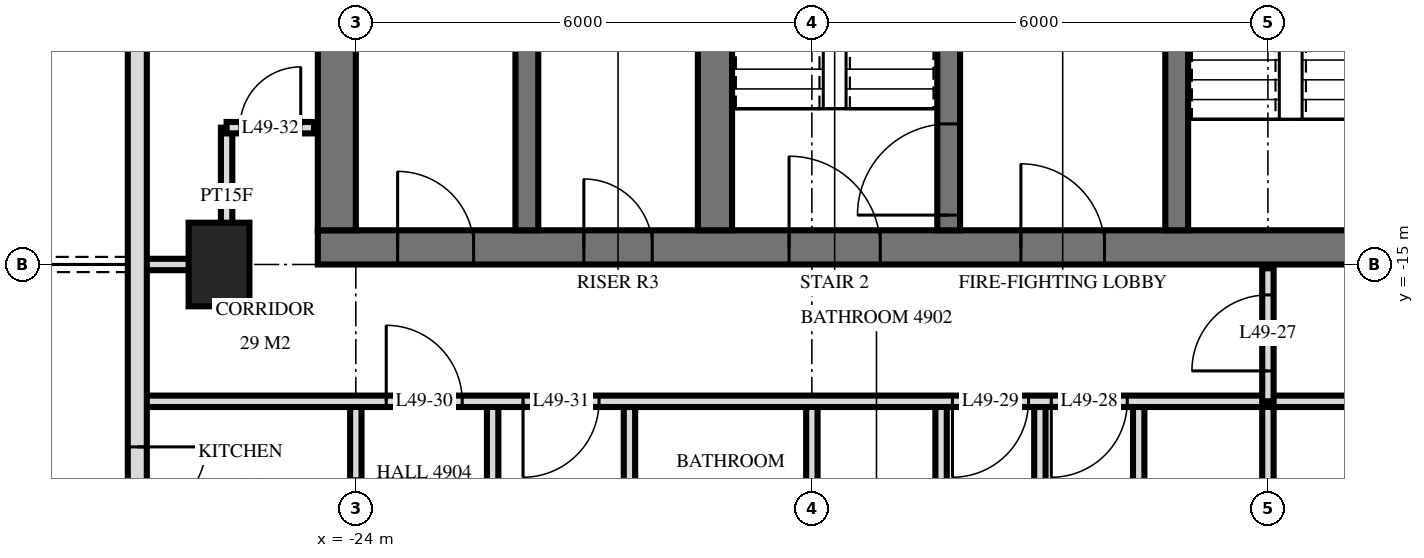
"""IFC4 building model, lengths in metres.
Left out: names, types, materials, properties, quantities, classifications, styles, units other than length and angle.
Written with IfcOpenShell. Run it as: python <this file> out.ifc"""

import sys

from ifc_helpers import new_model, si_unit, direction, frame, frame_2d, origin, origin_2d, place, context, subcontext, project, spatial, rectangle, extrude, element, fill, save


model = new_model("IFC4")
c1 = context("Model", 3, precision=1e-05, world=origin(), true_north=direction((0.0, 1.0)))
c2 = subcontext(c1, "Body", "Model", "MODEL_VIEW")
j1 = project(units=[si_unit("LENGTHUNIT", "METRE"), si_unit("PLANEANGLEUNIT", "RADIAN")], contexts=[c1])
p1 = place(None, origin())
s1 = spatial("IfcSite", under=j1, at=p1, CompositionType="ELEMENT")
p2 = place(p1, origin())
s2 = spatial("IfcBuilding", under=s1, at=p2, CompositionType="ELEMENT")
p3 = place(p2, frame((0.0, 0.0, 190.6)))
s3 = spatial("IfcBuildingStorey", under=s2, at=p3, CompositionType="ELEMENT", Elevation=190.6)
p4 = place(p3, frame((-25.8, -15.0, 0.0), z_axis=(0.0, 0.0, 1.0), x_axis=(0.0, 1.0, 0.0)))
e1 = element("IfcColumn", 1, at=p4, inside=s3, PredefinedType="COLUMN", context=c2, shape_type="SweptSolid", body=[
    extrude(rectangle(XDim=1.1, YDim=0.8, at=origin_2d()), origin(), (0.0, 0.0, 1.0), 3.5),
])
p5 = place(p3, frame((-24.5, -14.775, 0.0), z_axis=(0.0, 0.0, 1.0), x_axis=(1.0, 0.0, 0.0)))
e2 = element("IfcWall", 2, at=p5, inside=s3, PredefinedType="SHEAR", context=c2, shape_type="SweptSolid", body=[
    extrude(rectangle(XDim=14.5, YDim=0.45, at=frame_2d((7.25, 0.0))), origin(), (0.0, 0.0, 1.0), 3.5),
])
p6 = place(p5, frame((6.2, 0.0, 0.0)))
e3 = element("IfcOpeningElement", 3, at=p6, cuts=e2, PredefinedType="OPENING", context=c2, shape_type="SweptSolid", body=[
    extrude(rectangle(XDim=1.2, YDim=2.1, at=frame_2d((0.6, 1.05))), frame((0.0, 0.235, 0.0), z_axis=(0.0, -1.0, 0.0), x_axis=(1.0, 0.0, 0.0)), (0.0, 0.0, 1.0), 0.47),
])
p7 = place(p5, frame((9.25, 0.0, 0.0)))
e4 = element("IfcOpeningElement", 4, at=p7, cuts=e2, PredefinedType="OPENING", context=c2, shape_type="SweptSolid", body=[
    extrude(rectangle(XDim=1.1, YDim=2.1, at=frame_2d((0.55, 1.05))), frame((0.0, 0.235, 0.0), z_axis=(0.0, -1.0, 0.0), x_axis=(1.0, 0.0, 0.0)), (0.0, 0.0, 1.0), 0.47),
])
p8 = place(p5, frame((3.5, 0.0, 0.0)))
e5 = element("IfcOpeningElement", 5, at=p8, cuts=e2, PredefinedType="OPENING", context=c2, shape_type="SweptSolid", body=[
    extrude(rectangle(XDim=0.9, YDim=2.1, at=frame_2d((0.45, 1.05))), frame((0.0, 0.235, 0.0), z_axis=(0.0, -1.0, 0.0), x_axis=(1.0, 0.0, 0.0)), (0.0, 0.0, 1.0), 0.47),
])
p9 = place(p5, frame((1.05, 0.0, 0.0)))
e6 = element("IfcOpeningElement", 6, at=p9, cuts=e2, PredefinedType="OPENING", context=c2, shape_type="SweptSolid", body=[
    extrude(rectangle(XDim=1.0, YDim=2.1, at=frame_2d((0.5, 1.05))), frame((0.0, 0.235, 0.0), z_axis=(0.0, -1.0, 0.0), x_axis=(1.0, 0.0, 0.0)), (0.0, 0.0, 1.0), 0.47),
])
p10 = place(p3, frame((-24.25, -14.55, 0.0), z_axis=(0.0, 0.0, 1.0), x_axis=(0.0, 1.0, 0.0)))
e7 = element("IfcWall", 7, at=p10, inside=s3, PredefinedType="SHEAR", context=c2, shape_type="SweptSolid", body=[
    extrude(rectangle(XDim=14.1, YDim=0.5, at=frame_2d((7.05, 0.0))), origin(), (0.0, 0.0, 1.0), 3.5),
])
p11 = place(p3, frame((-13.2, -14.55, 0.0), z_axis=(0.0, 0.0, 1.0), x_axis=(0.0, 1.0, 0.0)))
e8 = element("IfcWall", 8, at=p11, inside=s3, PredefinedType="SHEAR", context=c2, shape_type="SweptSolid", body=[
    extrude(rectangle(XDim=5.4, YDim=0.3, at=frame_2d((2.7, 0.0))), origin(), (0.0, 0.0, 1.0), 3.5),
])
p12 = place(p11, frame((4.0, 0.0, 0.0)))
e9 = element("IfcOpeningElement", 9, at=p12, cuts=e8, PredefinedType="OPENING", context=c2, shape_type="SweptSolid", body=[
    extrude(rectangle(XDim=1.2, YDim=2.1, at=frame_2d((0.6, 1.05))), frame((0.0, 0.16, 0.0), z_axis=(0.0, -1.0, 0.0), x_axis=(1.0, 0.0, 0.0)), (0.0, 0.0, 1.0), 0.32),
])
p13 = place(p3, frame((-16.2, -14.55, 0.0), z_axis=(0.0, 0.0, 1.0), x_axis=(0.0, 1.0, 0.0)))
e10 = element("IfcWall", 10, at=p13, inside=s3, PredefinedType="SHEAR", context=c2, shape_type="SweptSolid", body=[
    extrude(rectangle(XDim=5.4, YDim=0.3, at=frame_2d((2.7, 0.0))), origin(), (0.0, 0.0, 1.0), 3.5),
])
p14 = place(p13, frame((0.2, 0.0, 0.0)))
e11 = element("IfcOpeningElement", 11, at=p14, cuts=e10, PredefinedType="OPENING", context=c2, shape_type="SweptSolid", body=[
    extrude(rectangle(XDim=1.2, YDim=2.1, at=frame_2d((0.6, 1.05))), frame((0.0, 0.16, 0.0), z_axis=(0.0, -1.0, 0.0), x_axis=(1.0, 0.0, 0.0)), (0.0, 0.0, 1.0), 0.32),
])
p15 = place(p3, frame((-19.275, -14.55, 0.0), z_axis=(0.0, 0.0, 1.0), x_axis=(0.0, 1.0, 0.0)))
e12 = element("IfcWall", 12, at=p15, inside=s3, PredefinedType="SHEAR", context=c2, shape_type="SweptSolid", body=[
    extrude(rectangle(XDim=5.4, YDim=0.45, at=frame_2d((2.7, 0.0))), origin(), (0.0, 0.0, 1.0), 3.5),
])
p16 = place(p3, frame((-21.75, -14.55, 0.0), z_axis=(0.0, 0.0, 1.0), x_axis=(0.0, 1.0, 0.0)))
e13 = element("IfcWall", 13, at=p16, inside=s3, PredefinedType="SHEAR", context=c2, shape_type="SweptSolid", body=[
    extrude(rectangle(XDim=5.4, YDim=0.3, at=frame_2d((2.7, 0.0))), origin(), (0.0, 0.0, 1.0), 3.5),
])
p17 = place(p3, frame((-26.875, -3.325, 0.0), z_axis=(0.0, 0.0, 1.0), x_axis=(0.0, -1.0, 0.0)))
e14 = element("IfcWall", 14, at=p17, inside=s3, PredefinedType="SOLIDWALL", context=c2, shape_type="SweptSolid", body=[
    extrude(rectangle(XDim=21.551, YDim=0.25, at=frame_2d((10.775, 0.0))), origin(), (0.0, 0.0, 1.0), 3.22),
])
p18 = place(p17, frame((7.025, 0.0, 0.0)))
e15 = element("IfcOpeningElement", 15, at=p18, cuts=e14, PredefinedType="OPENING", context=c2, shape_type="SweptSolid", body=[
    extrude(rectangle(XDim=1.8, YDim=2.4, at=frame_2d((0.9, 1.2))), frame((0.0, 0.135, 0.0), z_axis=(0.0, -1.0, 0.0), x_axis=(1.0, 0.0, 0.0)), (0.0, 0.0, 1.0), 0.27),
])
p19 = place(p17, frame((14.075, 0.0, 0.0)))
e16 = element("IfcOpeningElement", 16, at=p19, cuts=e14, PredefinedType="OPENING", context=c2, shape_type="SweptSolid", body=[
    extrude(rectangle(XDim=1.8, YDim=2.4, at=frame_2d((0.9, 1.2))), frame((0.0, 0.135, 0.0), z_axis=(0.0, -1.0, 0.0), x_axis=(1.0, 0.0, 0.0)), (0.0, 0.0, 1.0), 0.27),
])
p20 = place(p17, frame((18.875, 0.0, 0.0)))
e17 = element("IfcOpeningElement", 17, at=p20, cuts=e14, PredefinedType="OPENING", context=c2, shape_type="SweptSolid", body=[
    extrude(rectangle(XDim=1.8, YDim=2.4, at=frame_2d((0.9, 1.2))), frame((0.0, 0.135, 0.0), z_axis=(0.0, -1.0, 0.0), x_axis=(1.0, 0.0, 0.0)), (0.0, 0.0, 1.0), 0.27),
])
p21 = place(p3, frame((-12.0, -16.8, 0.0), z_axis=(0.0, 0.0, 1.0), x_axis=(0.0, 1.0, 0.0)))
e18 = element("IfcWall", 18, at=p21, inside=s3, PredefinedType="PARTITIONING", context=c2, shape_type="SweptSolid", body=[
    extrude(rectangle(XDim=1.75, YDim=0.15, at=frame_2d((0.875, 0.0))), origin(), (0.0, 0.0, 1.0), 3.22),
])
p22 = place(p21, frame((0.4, 0.0, 0.0)))
e19 = element("IfcOpeningElement", 19, at=p22, cuts=e18, PredefinedType="OPENING", context=c2, shape_type="SweptSolid", body=[
    extrude(rectangle(XDim=1.0, YDim=2.1, at=frame_2d((0.5, 1.05))), frame((0.0, 0.085, 0.0), z_axis=(0.0, -1.0, 0.0), x_axis=(1.0, 0.0, 0.0)), (0.0, 0.0, 1.0), 0.17),
])
p23 = place(p3, frame((-12.0, -29.22, 0.0), z_axis=(0.0, 0.0, 1.0), x_axis=(0.0, 1.0, 0.0)))
e20 = element("IfcWall", 20, at=p23, inside=s3, PredefinedType="PARTITIONING", context=c2, shape_type="SweptSolid", body=[
    extrude(rectangle(XDim=12.42, YDim=0.15, at=frame_2d((6.21, 0.0))), origin(), (0.0, 0.0, 1.0), 3.22),
])
p24 = place(p3, frame((-13.7, -19.8, 0.0), z_axis=(0.0, 0.0, 1.0), x_axis=(0.0, 1.0, 0.0)))
e21 = element("IfcWall", 21, at=p24, inside=s3, PredefinedType="PARTITIONING", context=c2, shape_type="SweptSolid", body=[
    extrude(rectangle(XDim=3.0, YDim=0.15, at=frame_2d((1.5, 0.0))), origin(), (0.0, 0.0, 1.0), 3.22),
])
p25 = place(p24, frame((1.1, 0.0, 0.0)))
e22 = element("IfcOpeningElement", 22, at=p25, cuts=e21, PredefinedType="OPENING", context=c2, shape_type="SweptSolid", body=[
    extrude(rectangle(XDim=0.8, YDim=2.1, at=frame_2d((0.4, 1.05))), frame((0.0, 0.085, 0.0), z_axis=(0.0, -1.0, 0.0), x_axis=(1.0, 0.0, 0.0)), (0.0, 0.0, 1.0), 0.17),
])
p26 = place(p3, frame((-15.0, -29.22, 0.0), z_axis=(0.0, 0.0, 1.0), x_axis=(0.0, 1.0, 0.0)))
e23 = element("IfcWall", 23, at=p26, inside=s3, PredefinedType="PARTITIONING", context=c2, shape_type="SweptSolid", body=[
    extrude(rectangle(XDim=12.42, YDim=0.15, at=frame_2d((6.21, 0.0))), origin(), (0.0, 0.0, 1.0), 3.22),
])
p27 = place(p3, frame((-16.3, -19.8, 0.0), z_axis=(0.0, 0.0, 1.0), x_axis=(0.0, 1.0, 0.0)))
e24 = element("IfcWall", 24, at=p27, inside=s3, PredefinedType="PARTITIONING", context=c2, shape_type="SweptSolid", body=[
    extrude(rectangle(XDim=3.0, YDim=0.15, at=frame_2d((1.5, 0.0))), origin(), (0.0, 0.0, 1.0), 3.22),
])
p28 = place(p27, frame((1.1, 0.0, 0.0)))
e25 = element("IfcOpeningElement", 25, at=p28, cuts=e24, PredefinedType="OPENING", context=c2, shape_type="SweptSolid", body=[
    extrude(rectangle(XDim=0.8, YDim=2.1, at=frame_2d((0.4, 1.05))), frame((0.0, 0.085, 0.0), z_axis=(0.0, -1.0, 0.0), x_axis=(1.0, 0.0, 0.0)), (0.0, 0.0, 1.0), 0.17),
])
p29 = place(p3, frame((-18.0, -29.22, 0.0), z_axis=(0.0, 0.0, 1.0), x_axis=(0.0, 1.0, 0.0)))
e26 = element("IfcWall", 26, at=p29, inside=s3, PredefinedType="PARTITIONING", context=c2, shape_type="SweptSolid", body=[
    extrude(rectangle(XDim=12.42, YDim=0.15, at=frame_2d((6.21, 0.0))), origin(), (0.0, 0.0, 1.0), 3.22),
])
for number, where, z_axis, x_axis in (
    (27, (-20.4, -19.8, 0.0), (0.0, 0.0, 1.0), (0.0, 1.0, 0.0)),
    (28, (-22.2, -19.8, 0.0), (0.0, 0.0, 1.0), (0.0, 1.0, 0.0)),
):
    element("IfcWall", number, at=place(p3, frame(where, z_axis=z_axis, x_axis=x_axis)), inside=s3, PredefinedType="PARTITIONING", context=c2, shape_type="SweptSolid", body=[
        extrude(rectangle(XDim=3.0, YDim=0.15, at=frame_2d((1.5, 0.0))), origin(), (0.0, 0.0, 1.0), 3.22),
    ])
p30 = place(p3, frame((-24.0, -19.8, 0.0), z_axis=(0.0, 0.0, 1.0), x_axis=(0.0, 1.0, 0.0)))
e29 = element("IfcWall", 29, at=p30, inside=s3, PredefinedType="PARTITIONING", context=c2, shape_type="SweptSolid", body=[
    extrude(rectangle(XDim=3.0, YDim=0.15, at=frame_2d((1.5, 0.0))), origin(), (0.0, 0.0, 1.0), 3.22),
])
p31 = place(p30, frame((0.98, 0.0, 0.0)))
e30 = element("IfcOpeningElement", 30, at=p31, cuts=e29, PredefinedType="OPENING", context=c2, shape_type="SweptSolid", body=[
    extrude(rectangle(XDim=1.0, YDim=2.1, at=frame_2d((0.5, 1.05))), frame((0.0, 0.085, 0.0), z_axis=(0.0, -1.0, 0.0), x_axis=(1.0, 0.0, 0.0)), (0.0, 0.0, 1.0), 0.17),
])
p32 = place(p3, frame((-25.7, -15.0, 0.0), z_axis=(0.0, 0.0, 1.0), x_axis=(0.0, 1.0, 0.0)))
e31 = element("IfcWall", 31, at=p32, inside=s3, PredefinedType="PARTITIONING", context=c2, shape_type="SweptSolid", body=[
    extrude(rectangle(XDim=1.8, YDim=0.15, at=frame_2d((0.9, 0.0))), origin(), (0.0, 0.0, 1.0), 3.22),
])
p33 = place(p3, frame((-26.82, -16.8, 0.0), z_axis=(0.0, 0.0, 1.0), x_axis=(1.0, 0.0, 0.0)))
e32 = element("IfcWall", 32, at=p33, inside=s3, PredefinedType="PARTITIONING", context=c2, shape_type="SweptSolid", body=[
    extrude(rectangle(XDim=53.64, YDim=0.15, at=frame_2d((26.82, 0.0))), origin(), (0.0, 0.0, 1.0), 3.22),
])
p34 = place(p33, frame((11.97, 0.0, 0.0)))
e33 = element("IfcOpeningElement", 33, at=p34, cuts=e32, PredefinedType="OPENING", context=c2, shape_type="SweptSolid", body=[
    extrude(rectangle(XDim=1.0, YDim=2.1, at=frame_2d((0.5, 1.05))), frame((0.0, 0.085, 0.0), z_axis=(0.0, -1.0, 0.0), x_axis=(1.0, 0.0, 0.0)), (0.0, 0.0, 1.0), 0.17),
])
p35 = place(p33, frame((10.67, 0.0, 0.0)))
e34 = element("IfcOpeningElement", 34, at=p35, cuts=e32, PredefinedType="OPENING", context=c2, shape_type="SweptSolid", body=[
    extrude(rectangle(XDim=1.0, YDim=2.1, at=frame_2d((0.5, 1.05))), frame((0.0, 0.085, 0.0), z_axis=(0.0, -1.0, 0.0), x_axis=(1.0, 0.0, 0.0)), (0.0, 0.0, 1.0), 0.17),
])
p36 = place(p33, frame((3.22, 0.0, 0.0)))
e35 = element("IfcOpeningElement", 35, at=p36, cuts=e32, PredefinedType="OPENING", context=c2, shape_type="SweptSolid", body=[
    extrude(rectangle(XDim=1.0, YDim=2.1, at=frame_2d((0.5, 1.05))), frame((0.0, 0.085, 0.0), z_axis=(0.0, -1.0, 0.0), x_axis=(1.0, 0.0, 0.0)), (0.0, 0.0, 1.0), 0.17),
])
p37 = place(p33, frame((5.02, 0.0, 0.0)))
e36 = element("IfcOpeningElement", 36, at=p37, cuts=e32, PredefinedType="OPENING", context=c2, shape_type="SweptSolid", body=[
    extrude(rectangle(XDim=1.0, YDim=2.1, at=frame_2d((0.5, 1.05))), frame((0.0, 0.085, 0.0), z_axis=(0.0, -1.0, 0.0), x_axis=(1.0, 0.0, 0.0)), (0.0, 0.0, 1.0), 0.17),
])
p38 = place(p33, frame((38.97, 0.0, 0.0)))
e37 = element("IfcOpeningElement", 37, at=p38, cuts=e32, PredefinedType="OPENING", context=c2, shape_type="SweptSolid", body=[
    extrude(rectangle(XDim=1.0, YDim=2.1, at=frame_2d((0.5, 1.05))), frame((0.0, 0.085, 0.0), z_axis=(0.0, -1.0, 0.0), x_axis=(1.0, 0.0, 0.0)), (0.0, 0.0, 1.0), 0.17),
])
p39 = place(p33, frame((48.72, 0.0, 0.0)))
e38 = element("IfcOpeningElement", 38, at=p39, cuts=e32, PredefinedType="OPENING", context=c2, shape_type="SweptSolid", body=[
    extrude(rectangle(XDim=1.0, YDim=2.1, at=frame_2d((0.5, 1.05))), frame((0.0, 0.085, 0.0), z_axis=(0.0, -1.0, 0.0), x_axis=(1.0, 0.0, 0.0)), (0.0, 0.0, 1.0), 0.17),
])
p40 = place(p33, frame((46.92, 0.0, 0.0)))
e39 = element("IfcOpeningElement", 39, at=p40, cuts=e32, PredefinedType="OPENING", context=c2, shape_type="SweptSolid", body=[
    extrude(rectangle(XDim=1.0, YDim=2.1, at=frame_2d((0.5, 1.05))), frame((0.0, 0.085, 0.0), z_axis=(0.0, -1.0, 0.0), x_axis=(1.0, 0.0, 0.0)), (0.0, 0.0, 1.0), 0.17),
])
p41 = place(p33, frame((18.32, 0.0, 0.0)))
e40 = element("IfcOpeningElement", 40, at=p41, cuts=e32, PredefinedType="OPENING", context=c2, shape_type="SweptSolid", body=[
    extrude(rectangle(XDim=1.0, YDim=2.1, at=frame_2d((0.5, 1.05))), frame((0.0, 0.085, 0.0), z_axis=(0.0, -1.0, 0.0), x_axis=(1.0, 0.0, 0.0)), (0.0, 0.0, 1.0), 0.17),
])
p42 = place(p33, frame((26.32, 0.0, 0.0)))
e41 = element("IfcOpeningElement", 41, at=p42, cuts=e32, PredefinedType="OPENING", context=c2, shape_type="SweptSolid", body=[
    extrude(rectangle(XDim=1.0, YDim=2.1, at=frame_2d((0.5, 1.05))), frame((0.0, 0.085, 0.0), z_axis=(0.0, -1.0, 0.0), x_axis=(1.0, 0.0, 0.0)), (0.0, 0.0, 1.0), 0.17),
])
p43 = place(p33, frame((34.32, 0.0, 0.0)))
e42 = element("IfcOpeningElement", 42, at=p43, cuts=e32, PredefinedType="OPENING", context=c2, shape_type="SweptSolid", body=[
    extrude(rectangle(XDim=1.0, YDim=2.1, at=frame_2d((0.5, 1.05))), frame((0.0, 0.085, 0.0), z_axis=(0.0, -1.0, 0.0), x_axis=(1.0, 0.0, 0.0)), (0.0, 0.0, 1.0), 0.17),
])
p44 = place(p3, frame((-26.82, -15.0, 0.0), z_axis=(0.0, 0.0, 1.0), x_axis=(1.0, 0.0, 0.0)))
e43 = element("IfcWall", 43, at=p44, inside=s3, PredefinedType="PARTITIONING", context=c2, shape_type="SweptSolid", body=[
    extrude(rectangle(XDim=1.12, YDim=0.15, at=frame_2d((0.56, 0.0))), origin(), (0.0, 0.0, 1.0), 3.22),
])
p45 = place(p3, frame((-25.7, -13.2, 0.0), z_axis=(0.0, 0.0, 1.0), x_axis=(1.0, 0.0, 0.0)))
e44 = element("IfcWall", 44, at=p45, inside=s3, PredefinedType="PARTITIONING", context=c2, shape_type="SweptSolid", body=[
    extrude(rectangle(XDim=1.15, YDim=0.15, at=frame_2d((0.575, 0.0))), origin(), (0.0, 0.0, 1.0), 3.22),
])
p46 = place(p45, frame((0.175, 0.0, 0.0)))
e45 = element("IfcOpeningElement", 45, at=p46, cuts=e44, PredefinedType="OPENING", context=c2, shape_type="SweptSolid", body=[
    extrude(rectangle(XDim=0.8, YDim=2.1, at=frame_2d((0.4, 1.05))), frame((0.0, 0.085, 0.0), z_axis=(0.0, -1.0, 0.0), x_axis=(1.0, 0.0, 0.0)), (0.0, 0.0, 1.0), 0.17),
])
p47 = place(p19, origin())
e46 = element("IfcDoor", 46, at=p47, inside=s3, OperationType="DOUBLE_DOOR_SINGLE_SWING", PredefinedType="DOOR", context=c2, shape_type="SweptSolid", body=[
    extrude(rectangle(XDim=1.8, YDim=2.4, at=frame_2d((0.9, 1.2))), frame((0.0, 0.025, 0.0), z_axis=(0.0, -1.0, 0.0), x_axis=(1.0, 0.0, 0.0)), (0.0, 0.0, 1.0), 0.05),
])
fill(e16, e46)
p48 = place(p6, origin())
e47 = element("IfcDoor", 47, at=p48, inside=s3, OperationType="SINGLE_SWING_RIGHT", PredefinedType="DOOR", context=c2, shape_type="SweptSolid", body=[
    extrude(rectangle(XDim=1.2, YDim=2.1, at=frame_2d((0.6, 1.05))), frame((0.0, 0.025, 0.0), z_axis=(0.0, -1.0, 0.0), x_axis=(1.0, 0.0, 0.0)), (0.0, 0.0, 1.0), 0.05),
])
fill(e3, e47)
p49 = place(p7, origin())
e48 = element("IfcDoor", 48, at=p49, inside=s3, OperationType="SINGLE_SWING_RIGHT", PredefinedType="DOOR", context=c2, shape_type="SweptSolid", body=[
    extrude(rectangle(XDim=1.1, YDim=2.1, at=frame_2d((0.55, 1.05))), frame((0.0, 0.025, 0.0), z_axis=(0.0, -1.0, 0.0), x_axis=(1.0, 0.0, 0.0)), (0.0, 0.0, 1.0), 0.05),
])
fill(e4, e48)
p50 = place(p8, origin())
e49 = element("IfcDoor", 49, at=p50, inside=s3, OperationType="SINGLE_SWING_RIGHT", PredefinedType="DOOR", context=c2, shape_type="SweptSolid", body=[
    extrude(rectangle(XDim=0.9, YDim=2.1, at=frame_2d((0.45, 1.05))), frame((0.0, 0.025, 0.0), z_axis=(0.0, -1.0, 0.0), x_axis=(1.0, 0.0, 0.0)), (0.0, 0.0, 1.0), 0.05),
])
fill(e5, e49)
p51 = place(p9, origin())
e50 = element("IfcDoor", 50, at=p51, inside=s3, OperationType="SINGLE_SWING_RIGHT", PredefinedType="DOOR", context=c2, shape_type="SweptSolid", body=[
    extrude(rectangle(XDim=1.0, YDim=2.1, at=frame_2d((0.5, 1.05))), frame((0.0, 0.025, 0.0), z_axis=(0.0, -1.0, 0.0), x_axis=(1.0, 0.0, 0.0)), (0.0, 0.0, 1.0), 0.05),
])
fill(e6, e50)
p52 = place(p14, origin())
e51 = element("IfcDoor", 51, at=p52, inside=s3, OperationType="SINGLE_SWING_RIGHT", PredefinedType="DOOR", context=c2, shape_type="SweptSolid", body=[
    extrude(rectangle(XDim=1.2, YDim=2.1, at=frame_2d((0.6, 1.05))), frame((0.0, 0.025, 0.0), z_axis=(0.0, -1.0, 0.0), x_axis=(1.0, 0.0, 0.0)), (0.0, 0.0, 1.0), 0.05),
])
fill(e11, e51)
p53 = place(p22, origin())
e52 = element("IfcDoor", 52, at=p53, inside=s3, OperationType="SINGLE_SWING_RIGHT", PredefinedType="DOOR", context=c2, shape_type="SweptSolid", body=[
    extrude(rectangle(XDim=1.0, YDim=2.1, at=frame_2d((0.5, 1.05))), frame((0.0, 0.025, 0.0), z_axis=(0.0, -1.0, 0.0), x_axis=(1.0, 0.0, 0.0)), (0.0, 0.0, 1.0), 0.05),
])
fill(e19, e52)
p54 = place(p34, frame((0.5, 0.0, 0.0), z_axis=(0.0, 0.0, 1.0), x_axis=(-1.0, 0.0, 0.0)))
e53 = element("IfcDoor", 53, at=p54, inside=s3, OperationType="SINGLE_SWING_LEFT", PredefinedType="DOOR", context=c2, shape_type="SweptSolid", body=[
    extrude(rectangle(XDim=1.0, YDim=2.1, at=frame_2d((0.0, 1.05))), frame((0.0, -0.025, 0.0), z_axis=(0.0, 1.0, 0.0), x_axis=(-1.0, 0.0, 0.0)), (0.0, 0.0, 1.0), 0.05),
])
fill(e33, e53)
p55 = place(p35, frame((0.5, 0.0, 0.0), z_axis=(0.0, 0.0, 1.0), x_axis=(-1.0, 0.0, 0.0)))
e54 = element("IfcDoor", 54, at=p55, inside=s3, OperationType="SINGLE_SWING_LEFT", PredefinedType="DOOR", context=c2, shape_type="SweptSolid", body=[
    extrude(rectangle(XDim=1.0, YDim=2.1, at=frame_2d((0.0, 1.05))), frame((0.0, -0.025, 0.0), z_axis=(0.0, 1.0, 0.0), x_axis=(-1.0, 0.0, 0.0)), (0.0, 0.0, 1.0), 0.05),
])
fill(e34, e54)
p56 = place(p36, origin())
e55 = element("IfcDoor", 55, at=p56, inside=s3, OperationType="SINGLE_SWING_RIGHT", PredefinedType="DOOR", context=c2, shape_type="SweptSolid", body=[
    extrude(rectangle(XDim=1.0, YDim=2.1, at=frame_2d((0.5, 1.05))), frame((0.0, 0.025, 0.0), z_axis=(0.0, -1.0, 0.0), x_axis=(1.0, 0.0, 0.0)), (0.0, 0.0, 1.0), 0.05),
])
fill(e35, e55)
p57 = place(p37, frame((0.5, 0.0, 0.0), z_axis=(0.0, 0.0, 1.0), x_axis=(-1.0, 0.0, 0.0)))
e56 = element("IfcDoor", 56, at=p57, inside=s3, OperationType="SINGLE_SWING_LEFT", PredefinedType="DOOR", context=c2, shape_type="SweptSolid", body=[
    extrude(rectangle(XDim=1.0, YDim=2.1, at=frame_2d((0.0, 1.05))), frame((0.0, -0.025, 0.0), z_axis=(0.0, 1.0, 0.0), x_axis=(-1.0, 0.0, 0.0)), (0.0, 0.0, 1.0), 0.05),
])
fill(e36, e56)
p58 = place(p46, origin())
e57 = element("IfcDoor", 57, at=p58, inside=s3, OperationType="SINGLE_SWING_LEFT", PredefinedType="DOOR", context=c2, shape_type="SweptSolid", body=[
    extrude(rectangle(XDim=0.8, YDim=2.1, at=frame_2d((0.4, 1.05))), frame((0.0, 0.025, 0.0), z_axis=(0.0, -1.0, 0.0), x_axis=(1.0, 0.0, 0.0)), (0.0, 0.0, 1.0), 0.05),
])
fill(e45, e57)
save(model, sys.argv[1])
